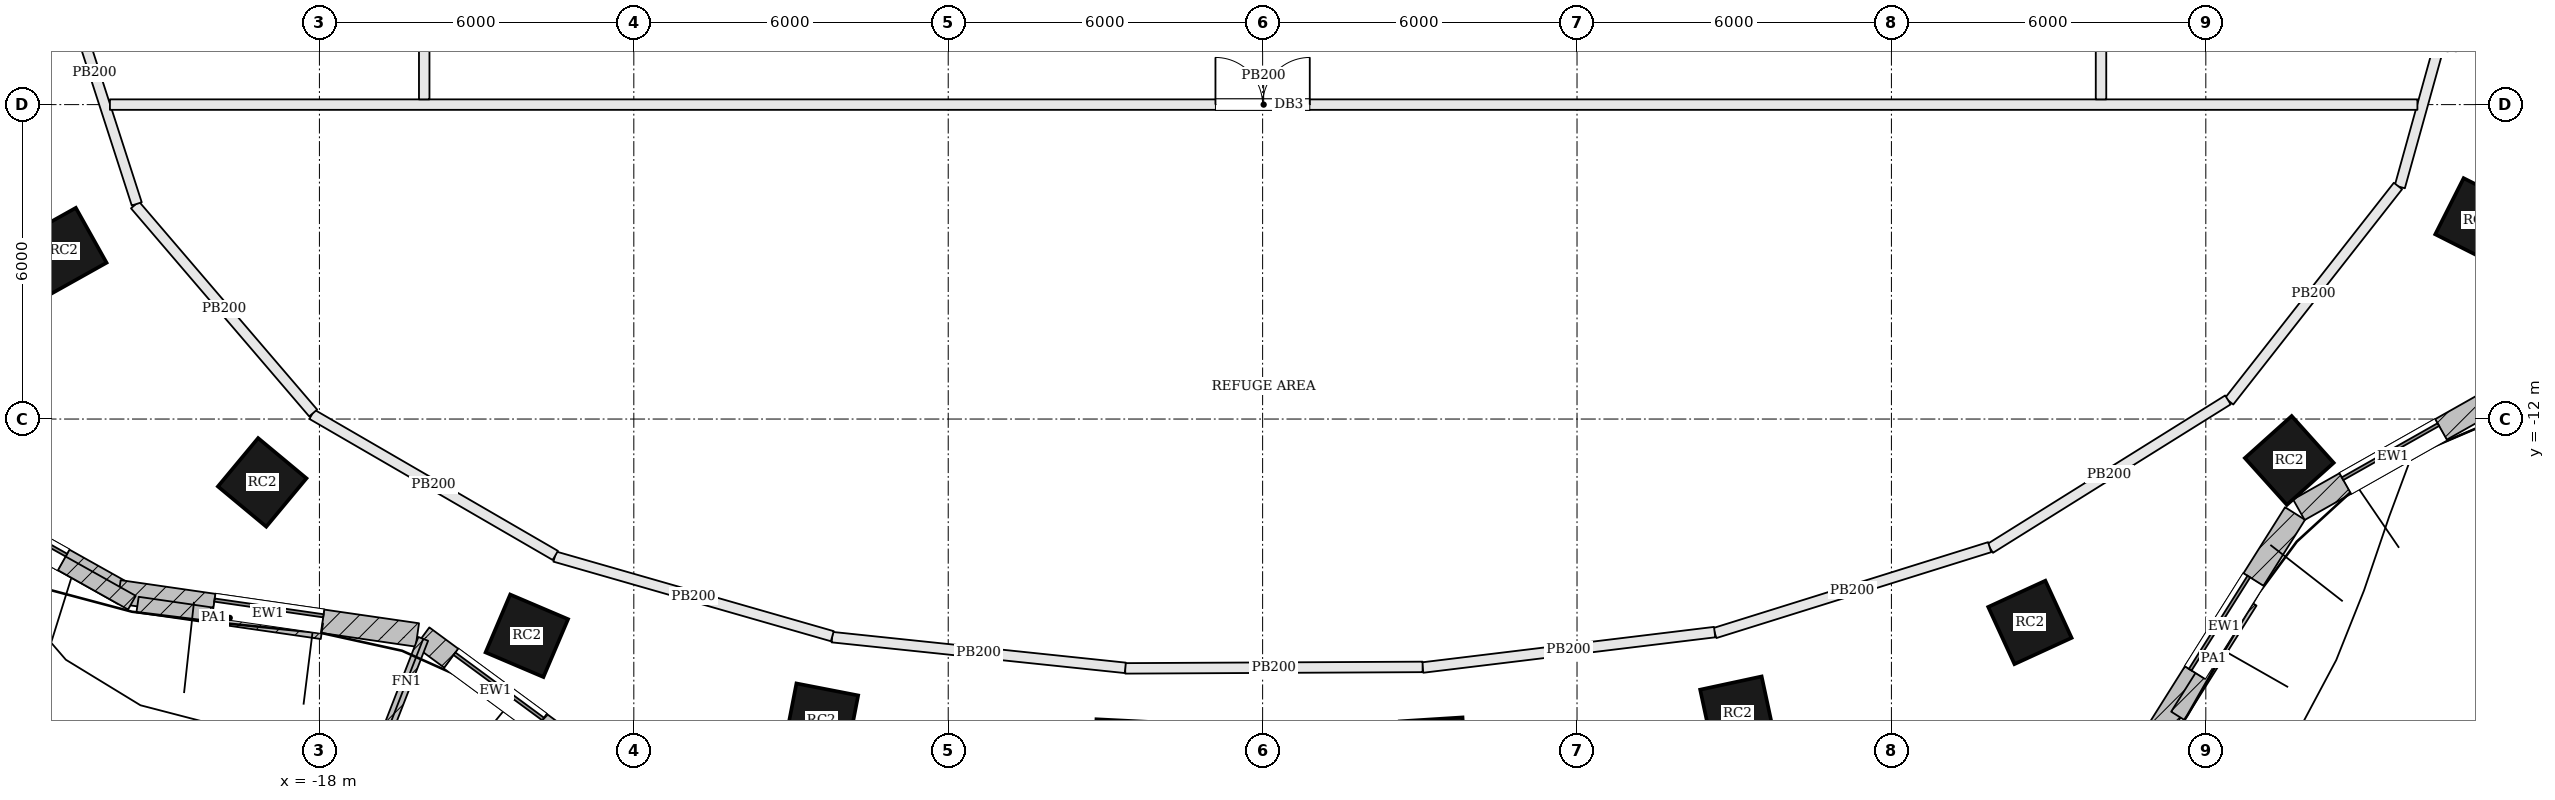
"""IFC4 building model, lengths in metres.
Left out: names, types, materials, properties, quantities, classifications, styles, units other than length and angle.
Written with IfcOpenShell. Run it as: python <this file> out.ifc"""

import sys

from ifc_helpers import new_model, si_unit, direction, frame, frame_2d, origin, origin_2d, place, context, subcontext, project, spatial, rectangle, extrude, element, fill, save


model = new_model("IFC4")
c1 = context("Model", 3, precision=1e-05, world=origin(), true_north=direction((0.0, 1.0)))
c2 = subcontext(c1, "Body", "Model", "MODEL_VIEW")
j1 = project(units=[si_unit("LENGTHUNIT", "METRE"), si_unit("PLANEANGLEUNIT", "RADIAN")], contexts=[c1])
p1 = place(None, origin())
s1 = spatial("IfcSite", under=j1, at=p1, CompositionType="ELEMENT")
p2 = place(p1, origin())
s2 = spatial("IfcBuilding", under=s1, at=p2, CompositionType="ELEMENT")
p3 = place(p2, frame((0.0, 0.0, 106.8)))
s3 = spatial("IfcBuildingStorey", under=s2, at=p3, CompositionType="ELEMENT", Elevation=106.8)
for number, where, z_axis, x_axis in (
    (1, (-22.879, -8.787, 0.0), (0.0, 0.0, 1.0), (0.489, -0.873, 0.0)),
    (2, (-19.092, -13.209, 0.0), (0.0, 0.0, 1.0), (0.769, -0.639, 0.0)),
    (3, (-14.042, -16.136, 0.0), (0.0, 0.0, 1.0), (0.92, -0.392, 0.0)),
    (4, (-8.422, -17.749, 0.0), (0.0, 0.0, 1.0), (0.982, -0.191, 0.0)),
    (5, (-2.602, -18.358, 0.0), (0.0, 0.0, 1.0), (0.999, -0.05, 0.0)),
    (6, (3.254, -18.33, 0.0), (0.0, 0.0, 1.0), (0.998, 0.063, 0.0)),
    (7, (9.063, -17.625, 0.0), (0.0, 0.0, 1.0), (0.978, 0.21, 0.0)),
    (8, (14.643, -15.881, 0.0), (0.0, 0.0, 1.0), (0.909, 0.417, 0.0)),
    (9, (19.593, -12.79, 0.0), (0.0, 0.0, 1.0), (0.744, 0.668, 0.0)),
    (10, (23.185, -8.21, 0.0), (0.0, 0.0, 1.0), (0.451, 0.893, 0.0)),
):
    element("IfcColumn", number, at=place(p3, frame(where, z_axis=z_axis, x_axis=x_axis)), inside=s3, PredefinedType="COLUMN", context=c2, shape_type="SweptSolid", body=[
        extrude(rectangle(XDim=1.2, YDim=1.2, at=origin_2d()), origin(), (0.0, 0.0, 1.0), 3.6),
    ])
p4 = place(p3, frame((-25.844, -13.028, 0.0), z_axis=(0.0, 0.0, 1.0), x_axis=(0.872346398261, -0.488888291373, 0.0)))
e11 = element("IfcWall", 11, at=p4, inside=s3, PredefinedType="SOLIDWALL", context=c2, shape_type="SweptSolid", body=[
    extrude(rectangle(XDim=4.696, YDim=0.45, at=frame_2d((2.348, 0.0))), origin(), (0.0, 0.0, 1.0), 3.4),
])
p5 = place(p4, frame((1.298, 0.0, 0.9)))
e12 = element("IfcOpeningElement", 12, at=p5, cuts=e11, PredefinedType="OPENING", context=c2, shape_type="SweptSolid", body=[
    extrude(rectangle(XDim=2.1, YDim=2.0, at=frame_2d((1.05, 1.0))), frame((0.0, 0.235, 0.0), z_axis=(0.0, -1.0, 0.0), x_axis=(1.0, 0.0, 0.0)), (0.0, 0.0, 1.0), 0.47),
])
p6 = place(p3, frame((-21.825, -15.297, 0.0), z_axis=(0.0, 0.0, 1.0), x_axis=(0.98971474215, -0.143054986527, 0.0)))
e13 = element("IfcWall", 13, at=p6, inside=s3, PredefinedType="SOLIDWALL", context=c2, shape_type="SweptSolid", body=[
    extrude(rectangle(XDim=5.753, YDim=0.45, at=frame_2d((2.876, 0.0))), origin(), (0.0, 0.0, 1.0), 3.4),
])
p7 = place(p6, frame((1.826, 0.0, 0.9)))
e14 = element("IfcOpeningElement", 14, at=p7, cuts=e13, PredefinedType="OPENING", context=c2, shape_type="SweptSolid", body=[
    extrude(rectangle(XDim=2.1, YDim=2.0, at=frame_2d((1.05, 1.0))), frame((0.0, 0.235, 0.0), z_axis=(0.0, -1.0, 0.0), x_axis=(1.0, 0.0, 0.0)), (0.0, 0.0, 1.0), 0.47),
])
p8 = place(p3, frame((-16.036, -16.158, 0.0), z_axis=(0.0, 0.0, 1.0), x_axis=(0.805181432967, -0.593028549064, 0.0)))
e15 = element("IfcWall", 15, at=p8, inside=s3, PredefinedType="SOLIDWALL", context=c2, shape_type="SweptSolid", body=[
    extrude(rectangle(XDim=3.469, YDim=0.45, at=frame_2d((1.734, 0.0))), origin(), (0.0, 0.0, 1.0), 3.4),
])
p9 = place(p8, frame((0.684, 0.0, 0.9)))
e16 = element("IfcOpeningElement", 16, at=p9, cuts=e15, PredefinedType="OPENING", context=c2, shape_type="SweptSolid", body=[
    extrude(rectangle(XDim=2.1, YDim=2.0, at=frame_2d((1.05, 1.0))), frame((0.0, 0.235, 0.0), z_axis=(0.0, -1.0, 0.0), x_axis=(1.0, 0.0, 0.0)), (0.0, 0.0, 1.0), 0.47),
])
p10 = place(p3, frame((16.998, -18.099, 0.0), z_axis=(0.0, 0.0, 1.0), x_axis=(0.532745661304, 0.846275404559, 0.0)))
e17 = element("IfcWall", 17, at=p10, inside=s3, PredefinedType="SOLIDWALL", context=c2, shape_type="SweptSolid", body=[
    extrude(rectangle(XDim=5.076, YDim=0.45, at=frame_2d((2.538, 0.0))), origin(), (0.0, 0.0, 1.0), 3.4),
])
p11 = place(p10, frame((1.488, 0.0, 0.9)))
e18 = element("IfcOpeningElement", 18, at=p11, cuts=e17, PredefinedType="OPENING", context=c2, shape_type="SweptSolid", body=[
    extrude(rectangle(XDim=2.1, YDim=2.0, at=frame_2d((1.05, 1.0))), frame((0.0, 0.235, 0.0), z_axis=(0.0, -1.0, 0.0), x_axis=(1.0, 0.0, 0.0)), (0.0, 0.0, 1.0), 0.47),
])
p12 = place(p3, frame((19.776, -13.731, 0.0), z_axis=(0.0, 0.0, 1.0), x_axis=(0.870610133829, 0.491973571318, 0.0)))
e19 = element("IfcWall", 19, at=p12, inside=s3, PredefinedType="SOLIDWALL", context=c2, shape_type="SweptSolid", body=[
    extrude(rectangle(XDim=4.134, YDim=0.45, at=frame_2d((2.067, 0.0))), origin(), (0.0, 0.0, 1.0), 3.4),
])
p13 = place(p12, frame((1.017, 0.0, 0.9)))
e20 = element("IfcOpeningElement", 20, at=p13, cuts=e19, PredefinedType="OPENING", context=c2, shape_type="SweptSolid", body=[
    extrude(rectangle(XDim=2.1, YDim=2.0, at=frame_2d((1.05, 1.0))), frame((0.0, 0.235, 0.0), z_axis=(0.0, -1.0, 0.0), x_axis=(1.0, 0.0, 0.0)), (0.0, 0.0, 1.0), 0.47),
])
p14 = place(p3, frame((-16.019, -16.195, 0.0), z_axis=(0.0, 0.0, 1.0), x_axis=(-0.362641522028, -0.931928713208, 0.0)))
e21 = element("IfcWall", 21, at=p14, inside=s3, PredefinedType="SOLIDWALL", context=c2, shape_type="SweptSolid", body=[
    extrude(rectangle(XDim=1.75, YDim=0.2, at=frame_2d((0.875, 0.0))), origin(), (0.0, 0.0, 1.0), 3.4),
])
p15 = place(p3, frame((-25.734, -13.176, 3.6), z_axis=(0.0, 0.0, 1.0), x_axis=(0.872345142407, -0.488890532245, 0.0)))
e22 = element("IfcWall", 22, at=p15, inside=s3, PredefinedType="PARAPET", context=c2, shape_type="SweptSolid", body=[
    extrude(rectangle(XDim=4.763, YDim=0.3, at=frame_2d((2.381, 0.0))), origin(), (0.0, 0.0, 1.0), 1.1),
])
p16 = place(p3, frame((-21.471, -15.541, 3.6), z_axis=(0.0, 0.0, 1.0), x_axis=(0.989713234374, -0.143065417571, 0.0)))
e23 = element("IfcWall", 23, at=p16, inside=s3, PredefinedType="PARAPET", context=c2, shape_type="SweptSolid", body=[
    extrude(rectangle(XDim=3.555, YDim=0.3, at=frame_2d((1.777, 0.0))), origin(), (0.0, 0.0, 1.0), 1.1),
])
p17 = place(p3, frame((17.466, -17.664, 3.6), z_axis=(0.0, 0.0, 1.0), x_axis=(0.532743008157, 0.846277074758, 0.0)))
e24 = element("IfcWall", 24, at=p17, inside=s3, PredefinedType="PARAPET", context=c2, shape_type="SweptSolid", body=[
    extrude(rectangle(XDim=2.581, YDim=0.3, at=frame_2d((1.29, 0.0))), origin(), (0.0, 0.0, 1.0), 1.1),
])
p18 = place(p3, frame((23.167, -2.295, 0.0), z_axis=(0.0, 0.0, 1.0), x_axis=(-0.267604764515, -0.963528769684, 0.0)))
e25 = element("IfcWall", 25, at=p18, inside=s3, PredefinedType="PARTITIONING", context=c2, shape_type="SweptSolid", body=[
    extrude(rectangle(XDim=5.475, YDim=0.2, at=frame_2d((2.737, 0.0))), origin(), (0.0, 0.0, 1.0), 3.4),
])
p19 = place(p3, frame((21.667, -7.553, 0.0), z_axis=(0.0, 0.0, 1.0), x_axis=(-0.617143909163, -0.786850300491, 0.0)))
e26 = element("IfcWall", 26, at=p19, inside=s3, PredefinedType="PARTITIONING", context=c2, shape_type="SweptSolid", body=[
    extrude(rectangle(XDim=5.221, YDim=0.2, at=frame_2d((2.61, 0.0))), origin(), (0.0, 0.0, 1.0), 3.4),
])
p20 = place(p3, frame((18.422, -11.635, 0.0), z_axis=(0.0, 0.0, 1.0), x_axis=(-0.848223876435, -0.529637853108, 0.0)))
e27 = element("IfcWall", 27, at=p20, inside=s3, PredefinedType="PARTITIONING", context=c2, shape_type="SweptSolid", body=[
    extrude(rectangle(XDim=5.349, YDim=0.2, at=frame_2d((2.674, 0.0))), origin(), (0.0, 0.0, 1.0), 3.4),
])
p21 = place(p3, frame((13.875, -14.445, 0.0), z_axis=(0.0, 0.0, 1.0), x_axis=(-0.954489463941, -0.298244636541, 0.0)))
e28 = element("IfcWall", 28, at=p21, inside=s3, PredefinedType="PARTITIONING", context=c2, shape_type="SweptSolid", body=[
    extrude(rectangle(XDim=5.495, YDim=0.2, at=frame_2d((2.748, 0.0))), origin(), (0.0, 0.0, 1.0), 3.4),
])
p22 = place(p3, frame((8.626, -16.066, 0.0), z_axis=(0.0, 0.0, 1.0), x_axis=(-0.992720392358, -0.120441780942, 0.0)))
e29 = element("IfcWall", 29, at=p22, inside=s3, PredefinedType="PARTITIONING", context=c2, shape_type="SweptSolid", body=[
    extrude(rectangle(XDim=5.613, YDim=0.2, at=frame_2d((2.806, 0.0))), origin(), (0.0, 0.0, 1.0), 3.4),
])
p23 = place(p3, frame((3.053, -16.73, 0.0), z_axis=(0.0, 0.0, 1.0), x_axis=(-0.999987762334, -0.004947239951, 0.0)))
e30 = element("IfcWall", 30, at=p23, inside=s3, PredefinedType="PARTITIONING", context=c2, shape_type="SweptSolid", body=[
    extrude(rectangle(XDim=5.675, YDim=0.2, at=frame_2d((2.837, 0.0))), origin(), (0.0, 0.0, 1.0), 3.4),
])
p24 = place(p3, frame((-2.621, -16.748, 0.0), z_axis=(0.0, 0.0, 1.0), x_axis=(-0.99455907377, 0.104174127222, 0.0)))
e31 = element("IfcWall", 31, at=p24, inside=s3, PredefinedType="PARTITIONING", context=c2, shape_type="SweptSolid", body=[
    extrude(rectangle(XDim=5.625, YDim=0.2, at=frame_2d((2.812, 0.0))), origin(), (0.0, 0.0, 1.0), 3.4),
])
p25 = place(p3, frame((-8.212, -16.144, 0.0), z_axis=(0.0, 0.0, 1.0), x_axis=(-0.961229052449, 0.275751171762, 0.0)))
e32 = element("IfcWall", 32, at=p25, inside=s3, PredefinedType="PARTITIONING", context=c2, shape_type="SweptSolid", body=[
    extrude(rectangle(XDim=5.509, YDim=0.2, at=frame_2d((2.754, 0.0))), origin(), (0.0, 0.0, 1.0), 3.4),
])
p26 = place(p3, frame((-13.498, -14.603, 0.0), z_axis=(0.0, 0.0, 1.0), x_axis=(-0.865099094035, 0.501600994317, 0.0)))
e33 = element("IfcWall", 33, at=p26, inside=s3, PredefinedType="PARTITIONING", context=c2, shape_type="SweptSolid", body=[
    extrude(rectangle(XDim=5.367, YDim=0.2, at=frame_2d((2.684, 0.0))), origin(), (0.0, 0.0, 1.0), 3.4),
])
p27 = place(p3, frame((-18.119, -11.885, 0.0), z_axis=(0.0, 0.0, 1.0), x_axis=(-0.650510608515, 0.759497168006, 0.0)))
e34 = element("IfcWall", 34, at=p27, inside=s3, PredefinedType="PARTITIONING", context=c2, shape_type="SweptSolid", body=[
    extrude(rectangle(XDim=5.228, YDim=0.2, at=frame_2d((2.614, 0.0))), origin(), (0.0, 0.0, 1.0), 3.4),
])
p28 = place(p3, frame((-21.486, -7.895, 0.0), z_axis=(0.0, 0.0, 1.0), x_axis=(-0.307481575482, 0.951554034587, 0.0)))
e35 = element("IfcWall", 35, at=p28, inside=s3, PredefinedType="PARTITIONING", context=c2, shape_type="SweptSolid", body=[
    extrude(rectangle(XDim=5.259, YDim=0.2, at=frame_2d((2.629, 0.0))), origin(), (0.0, 0.0, 1.0), 3.4),
])
p29 = place(p3, frame((-21.998, -6.0, 0.0), z_axis=(0.0, 0.0, 1.0), x_axis=(1.0, 0.0, 0.0)))
e36 = element("IfcWall", 36, at=p29, inside=s3, PredefinedType="PARTITIONING", context=c2, shape_type="SweptSolid", body=[
    extrude(rectangle(XDim=44.036, YDim=0.2, at=frame_2d((22.018, 0.0))), origin(), (0.0, 0.0, 1.0), 3.4),
])
p30 = place(p29, frame((21.098, 0.0, 0.0)))
e37 = element("IfcOpeningElement", 37, at=p30, cuts=e36, PredefinedType="OPENING", context=c2, shape_type="SweptSolid", body=[
    extrude(rectangle(XDim=1.8, YDim=2.1, at=frame_2d((0.9, 1.05))), frame((0.0, 0.11, 0.0), z_axis=(0.0, -1.0, 0.0), x_axis=(1.0, 0.0, 0.0)), (0.0, 0.0, 1.0), 0.22),
])
p31 = place(p3, frame((-16.0, 13.047, 0.0), z_axis=(0.0, 0.0, 1.0), x_axis=(0.0, -1.0, 0.0)))
e38 = element("IfcWall", 38, at=p31, inside=s3, PredefinedType="PARTITIONING", context=c2, shape_type="SweptSolid", body=[
    extrude(rectangle(XDim=18.947, YDim=0.2, at=frame_2d((9.474, 0.0))), origin(), (0.0, 0.0, 1.0), 3.4),
])
p32 = place(p31, frame((7.647, 0.0, 0.0)))
e39 = element("IfcOpeningElement", 39, at=p32, cuts=e38, PredefinedType="OPENING", context=c2, shape_type="SweptSolid", body=[
    extrude(rectangle(XDim=1.8, YDim=2.1, at=frame_2d((0.9, 1.05))), frame((0.0, 0.11, 0.0), z_axis=(0.0, -1.0, 0.0), x_axis=(1.0, 0.0, 0.0)), (0.0, 0.0, 1.0), 0.22),
])
p33 = place(p3, frame((16.0, -5.9, 0.0), z_axis=(0.0, 0.0, 1.0), x_axis=(0.0, 1.0, 0.0)))
e40 = element("IfcWall", 40, at=p33, inside=s3, PredefinedType="PARTITIONING", context=c2, shape_type="SweptSolid", body=[
    extrude(rectangle(XDim=18.952, YDim=0.2, at=frame_2d((9.476, 0.0))), origin(), (0.0, 0.0, 1.0), 3.4),
])
p34 = place(p33, frame((9.5, 0.0, 0.0)))
e41 = element("IfcOpeningElement", 41, at=p34, cuts=e40, PredefinedType="OPENING", context=c2, shape_type="SweptSolid", body=[
    extrude(rectangle(XDim=1.8, YDim=2.1, at=frame_2d((0.9, 1.05))), frame((0.0, 0.11, 0.0), z_axis=(0.0, -1.0, 0.0), x_axis=(1.0, 0.0, 0.0)), (0.0, 0.0, 1.0), 0.22),
])
p35 = place(p5, origin())
e42 = element("IfcWindow", 42, at=p35, inside=s3, PartitioningType="SINGLE_PANEL", PredefinedType="WINDOW", context=c2, shape_type="SweptSolid", body=[
    extrude(rectangle(XDim=2.1, YDim=2.0, at=frame_2d((1.05, 1.0))), frame((0.0, 0.135, 0.0), z_axis=(0.0, -1.0, 0.0), x_axis=(1.0, 0.0, 0.0)), (0.0, 0.0, 1.0), 0.06),
])
fill(e12, e42)
p36 = place(p7, origin())
e43 = element("IfcWindow", 43, at=p36, inside=s3, PartitioningType="SINGLE_PANEL", PredefinedType="WINDOW", context=c2, shape_type="SweptSolid", body=[
    extrude(rectangle(XDim=2.1, YDim=2.0, at=frame_2d((1.05, 1.0))), frame((0.0, 0.135, 0.0), z_axis=(0.0, -1.0, 0.0), x_axis=(1.0, 0.0, 0.0)), (0.0, 0.0, 1.0), 0.06),
])
fill(e14, e43)
p37 = place(p9, origin())
e44 = element("IfcWindow", 44, at=p37, inside=s3, PartitioningType="SINGLE_PANEL", PredefinedType="WINDOW", context=c2, shape_type="SweptSolid", body=[
    extrude(rectangle(XDim=2.1, YDim=2.0, at=frame_2d((1.05, 1.0))), frame((0.0, 0.135, 0.0), z_axis=(0.0, -1.0, 0.0), x_axis=(1.0, 0.0, 0.0)), (0.0, 0.0, 1.0), 0.06),
])
fill(e16, e44)
p38 = place(p11, origin())
e45 = element("IfcWindow", 45, at=p38, inside=s3, PartitioningType="SINGLE_PANEL", PredefinedType="WINDOW", context=c2, shape_type="SweptSolid", body=[
    extrude(rectangle(XDim=2.1, YDim=2.0, at=frame_2d((1.05, 1.0))), frame((0.0, 0.135, 0.0), z_axis=(0.0, -1.0, 0.0), x_axis=(1.0, 0.0, 0.0)), (0.0, 0.0, 1.0), 0.06),
])
fill(e18, e45)
p39 = place(p13, origin())
e46 = element("IfcWindow", 46, at=p39, inside=s3, PartitioningType="SINGLE_PANEL", PredefinedType="WINDOW", context=c2, shape_type="SweptSolid", body=[
    extrude(rectangle(XDim=2.1, YDim=2.0, at=frame_2d((1.05, 1.0))), frame((0.0, 0.135, 0.0), z_axis=(0.0, -1.0, 0.0), x_axis=(1.0, 0.0, 0.0)), (0.0, 0.0, 1.0), 0.06),
])
fill(e20, e46)
p40 = place(p30, origin())
e47 = element("IfcDoor", 47, at=p40, inside=s3, OperationType="DOUBLE_DOOR_SINGLE_SWING", PredefinedType="DOOR", context=c2, shape_type="SweptSolid", body=[
    extrude(rectangle(XDim=1.8, YDim=2.1, at=frame_2d((0.9, 1.05))), frame((0.0, 0.025, 0.0), z_axis=(0.0, -1.0, 0.0), x_axis=(1.0, 0.0, 0.0)), (0.0, 0.0, 1.0), 0.05),
])
fill(e37, e47)
save(model, sys.argv[1])
